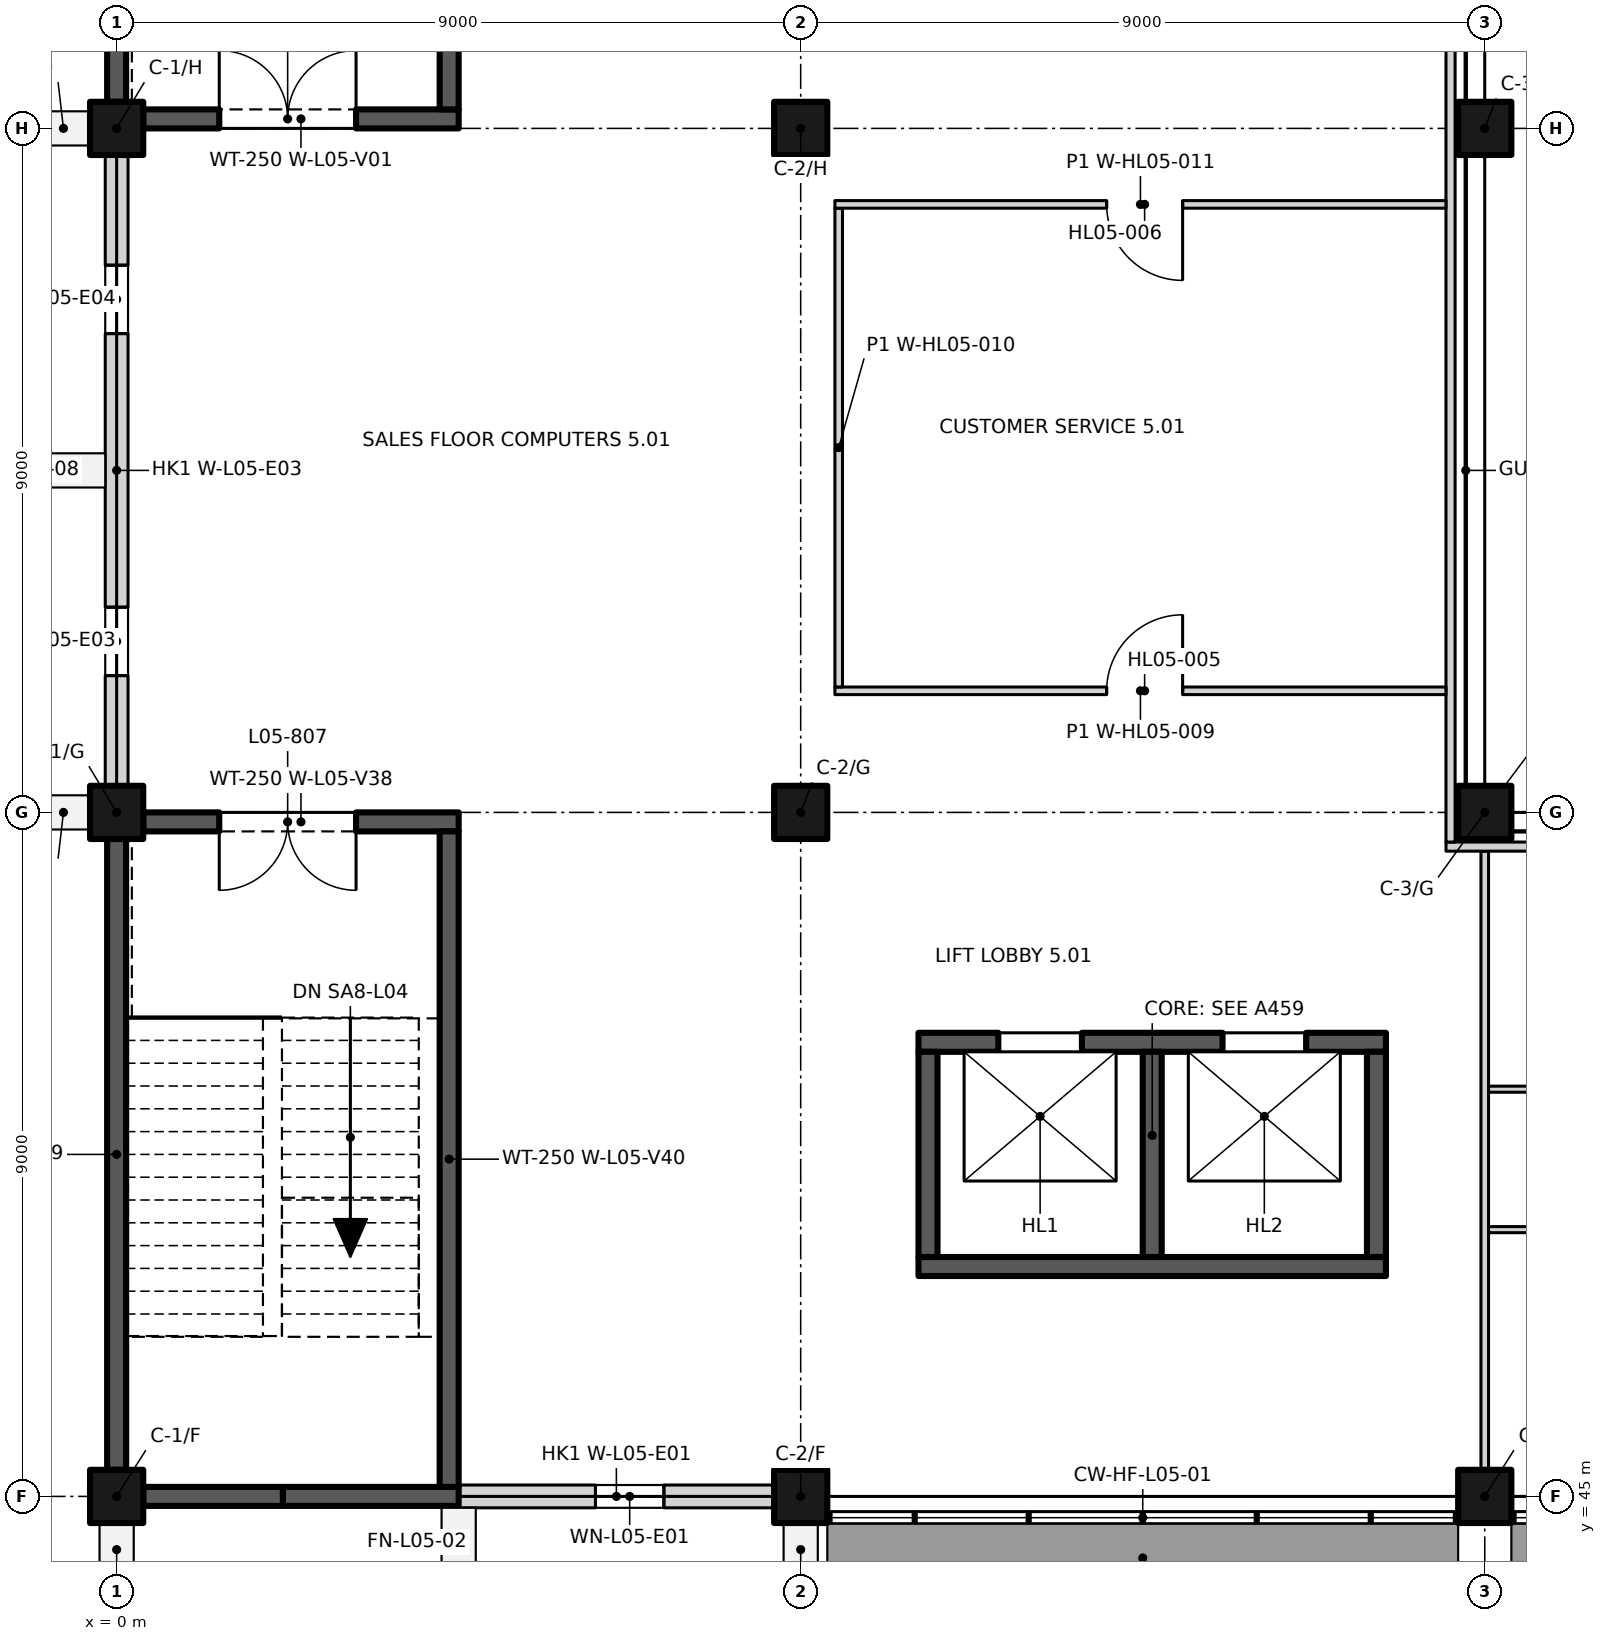
"""IFC4 building model, lengths in metres.
Left out: names, types, materials, properties, quantities, classifications, styles, units other than length and angle.
Written with IfcOpenShell. Run it as: python <this file> out.ifc"""

import sys

from ifc_helpers import new_model, si_unit, direction, frame, frame_2d, origin, origin_2d, place, context, subcontext, project, spatial, rectangle, extrude, element, fill, save


model = new_model("IFC4")
c1 = context("Model", 3, precision=1e-05, world=origin(), true_north=direction((0.0, 1.0)))
c2 = subcontext(c1, "Body", "Model", "MODEL_VIEW")
j1 = project(units=[si_unit("LENGTHUNIT", "METRE"), si_unit("PLANEANGLEUNIT", "RADIAN")], contexts=[c1])
p1 = place(None, origin())
s1 = spatial("IfcSite", under=j1, at=p1, CompositionType="ELEMENT")
p2 = place(p1, origin())
s2 = spatial("IfcBuilding", under=s1, at=p2, CompositionType="ELEMENT")
p3 = place(p2, frame((0.0, 0.0, 24.0)))
s3 = spatial("IfcBuildingStorey", under=s2, at=p3, CompositionType="ELEMENT", Elevation=24.0)
for number, where, z_axis, x_axis in (
    (1, (0.0, 45.0, 0.0), (0.0, 0.0, 1.0), (1.0, 0.0, 0.0)),
    (2, (9.0, 45.0, 0.0), (0.0, 0.0, 1.0), (1.0, 0.0, 0.0)),
    (3, (18.0, 45.0, 0.0), (0.0, 0.0, 1.0), (1.0, 0.0, 0.0)),
    (4, (0.0, 54.0, 0.0), (0.0, 0.0, 1.0), (1.0, 0.0, 0.0)),
    (5, (9.0, 54.0, 0.0), (0.0, 0.0, 1.0), (1.0, 0.0, 0.0)),
    (6, (18.0, 54.0, 0.0), (0.0, 0.0, 1.0), (1.0, 0.0, 0.0)),
    (7, (0.0, 63.0, 0.0), (0.0, 0.0, 1.0), (1.0, 0.0, 0.0)),
    (8, (9.0, 63.0, 0.0), (0.0, 0.0, 1.0), (1.0, 0.0, 0.0)),
    (9, (18.0, 63.0, 0.0), (0.0, 0.0, 1.0), (1.0, 0.0, 0.0)),
):
    element("IfcColumn", number, at=place(p3, frame(where, z_axis=z_axis, x_axis=x_axis)), inside=s3, PredefinedType="COLUMN", context=c2, shape_type="SweptSolid", body=[
        extrude(rectangle(XDim=0.7, YDim=0.7, at=origin_2d()), origin(), (0.0, 0.0, 1.0), 4.5),
    ])
p4 = place(p3, frame((0.35, 63.125, 0.0), z_axis=(0.0, 0.0, 1.0), x_axis=(1.0, 0.0, 0.0)))
e10 = element("IfcWall", 10, at=p4, inside=s3, PredefinedType="SHEAR", context=c2, shape_type="SweptSolid", body=[
    extrude(rectangle(XDim=4.15, YDim=0.25, at=frame_2d((2.075, 0.0))), origin(), (0.0, 0.0, 1.0), 4.2),
])
p5 = place(p4, frame((1.0, 0.0, 0.0)))
e11 = element("IfcOpeningElement", 11, at=p5, cuts=e10, PredefinedType="OPENING", context=c2, shape_type="SweptSolid", body=[
    extrude(rectangle(XDim=1.8, YDim=2.1, at=frame_2d((0.9, 1.05))), frame((0.0, 0.135, 0.0), z_axis=(0.0, -1.0, 0.0), x_axis=(1.0, 0.0, 0.0)), (0.0, 0.0, 1.0), 0.27),
])
p6 = place(p3, frame((0.0, 63.35, 0.0), z_axis=(0.0, 0.0, 1.0), x_axis=(0.0, 1.0, 0.0)))
e12 = element("IfcWall", 12, at=p6, inside=s3, PredefinedType="SHEAR", context=c2, shape_type="SweptSolid", body=[
    extrude(rectangle(XDim=8.3, YDim=0.25, at=frame_2d((4.15, 0.0))), origin(), (0.0, 0.0, 1.0), 3.7),
])
p7 = place(p3, frame((4.375, 63.25, 0.0), z_axis=(0.0, 0.0, 1.0), x_axis=(0.0, 1.0, 0.0)))
e13 = element("IfcWall", 13, at=p7, inside=s3, PredefinedType="SHEAR", context=c2, shape_type="SweptSolid", body=[
    extrude(rectangle(XDim=8.5, YDim=0.25, at=frame_2d((4.25, 0.0))), origin(), (0.0, 0.0, 1.0), 4.2),
])
p8 = place(p3, frame((0.35, 45.0, 0.0), z_axis=(0.0, 0.0, 1.0), x_axis=(1.0, 0.0, 0.0)))
e14 = element("IfcWall", 14, at=p8, inside=s3, PredefinedType="SHEAR", context=c2, shape_type="SweptSolid", body=[
    extrude(rectangle(XDim=1.838, YDim=0.25, at=frame_2d((0.919, 0.0))), origin(), (0.0, 0.0, 1.0), 3.7),
])
p9 = place(p3, frame((2.188, 45.0, 0.0), z_axis=(0.0, 0.0, 1.0), x_axis=(1.0, 0.0, 0.0)))
e15 = element("IfcWall", 15, at=p9, inside=s3, PredefinedType="SHEAR", context=c2, shape_type="SweptSolid", body=[
    extrude(rectangle(XDim=2.312, YDim=0.25, at=frame_2d((1.156, 0.0))), origin(), (0.0, 0.0, 1.0), 3.7),
])
p10 = place(p3, frame((0.35, 53.875, 0.0), z_axis=(0.0, 0.0, 1.0), x_axis=(1.0, 0.0, 0.0)))
e16 = element("IfcWall", 16, at=p10, inside=s3, PredefinedType="SHEAR", context=c2, shape_type="SweptSolid", body=[
    extrude(rectangle(XDim=4.15, YDim=0.25, at=frame_2d((2.075, 0.0))), origin(), (0.0, 0.0, 1.0), 4.2),
])
p11 = place(p10, frame((2.8, 0.0, 0.0), z_axis=(0.0, 0.0, 1.0), x_axis=(-1.0, 0.0, 0.0)))
e17 = element("IfcOpeningElement", 17, at=p11, cuts=e16, PredefinedType="OPENING", context=c2, shape_type="SweptSolid", body=[
    extrude(rectangle(XDim=1.8, YDim=2.1, at=frame_2d((0.9, 1.05))), frame((0.0, 0.135, 0.0), z_axis=(0.0, -1.0, 0.0), x_axis=(1.0, 0.0, 0.0)), (0.0, 0.0, 1.0), 0.27),
])
p12 = place(p3, frame((0.0, 45.35, 0.0), z_axis=(0.0, 0.0, 1.0), x_axis=(0.0, 1.0, 0.0)))
e18 = element("IfcWall", 18, at=p12, inside=s3, PredefinedType="SHEAR", context=c2, shape_type="SweptSolid", body=[
    extrude(rectangle(XDim=8.3, YDim=0.25, at=frame_2d((4.15, 0.0))), origin(), (0.0, 0.0, 1.0), 3.7),
])
p13 = place(p3, frame((4.375, 45.125, 0.0), z_axis=(0.0, 0.0, 1.0), x_axis=(0.0, 1.0, 0.0)))
e19 = element("IfcWall", 19, at=p13, inside=s3, PredefinedType="SHEAR", context=c2, shape_type="SweptSolid", body=[
    extrude(rectangle(XDim=8.625, YDim=0.25, at=frame_2d((4.312, 0.0))), origin(), (0.0, 0.0, 1.0), 4.2),
])
p14 = place(p3, frame((10.55, 50.975, 0.0), z_axis=(0.0, 0.0, 1.0), x_axis=(1.0, 0.0, 0.0)))
e20 = element("IfcWall", 20, at=p14, inside=s3, PredefinedType="SHEAR", context=c2, shape_type="SweptSolid", body=[
    extrude(rectangle(XDim=6.15, YDim=0.25, at=frame_2d((3.075, 0.0))), origin(), (0.0, 0.0, 1.0), 4.5),
])
p15 = place(p14, frame((1.05, 0.0, 0.0)))
e21 = element("IfcOpeningElement", 21, at=p15, cuts=e20, PredefinedType="OPENING", context=c2, shape_type="SweptSolid", body=[
    extrude(rectangle(XDim=1.1, YDim=2.1, at=frame_2d((0.55, 1.05))), frame((0.0, 0.135, 0.0), z_axis=(0.0, -1.0, 0.0), x_axis=(1.0, 0.0, 0.0)), (0.0, 0.0, 1.0), 0.27),
])
p16 = place(p14, frame((4.0, 0.0, 0.0)))
e22 = element("IfcOpeningElement", 22, at=p16, cuts=e20, PredefinedType="OPENING", context=c2, shape_type="SweptSolid", body=[
    extrude(rectangle(XDim=1.1, YDim=2.1, at=frame_2d((0.55, 1.05))), frame((0.0, 0.135, 0.0), z_axis=(0.0, -1.0, 0.0), x_axis=(1.0, 0.0, 0.0)), (0.0, 0.0, 1.0), 0.27),
])
p17 = place(p3, frame((10.55, 48.025, 0.0), z_axis=(0.0, 0.0, 1.0), x_axis=(1.0, 0.0, 0.0)))
e23 = element("IfcWall", 23, at=p17, inside=s3, PredefinedType="SHEAR", context=c2, shape_type="SweptSolid", body=[
    extrude(rectangle(XDim=6.15, YDim=0.25, at=frame_2d((3.075, 0.0))), origin(), (0.0, 0.0, 1.0), 4.5),
])
for number, where, z_axis, x_axis in (
    (24, (10.675, 48.15, 0.0), (0.0, 0.0, 1.0), (0.0, 1.0, 0.0)),
    (25, (13.625, 48.15, 0.0), (0.0, 0.0, 1.0), (0.0, 1.0, 0.0)),
    (26, (16.575, 48.15, 0.0), (0.0, 0.0, 1.0), (0.0, 1.0, 0.0)),
):
    element("IfcWall", number, at=place(p3, frame(where, z_axis=z_axis, x_axis=x_axis)), inside=s3, PredefinedType="SHEAR", context=c2, shape_type="SweptSolid", body=[
        extrude(rectangle(XDim=2.7, YDim=0.25, at=frame_2d((1.35, 0.0))), origin(), (0.0, 0.0, 1.0), 4.5),
    ])
p18 = place(p3, frame((8.65, 45.0, 0.0), z_axis=(0.0, 0.0, 1.0), x_axis=(-1.0, 0.0, 0.0)))
e27 = element("IfcWall", 27, at=p18, inside=s3, PredefinedType="SOLIDWALL", context=c2, shape_type="SweptSolid", body=[
    extrude(rectangle(XDim=4.15, YDim=0.3, at=frame_2d((2.075, 0.0))), origin(), (0.0, 0.0, 1.0), 3.7),
])
p19 = place(p18, frame((1.45, 0.0, 0.45)))
e28 = element("IfcOpeningElement", 28, at=p19, cuts=e27, PredefinedType="OPENING", context=c2, shape_type="SweptSolid", body=[
    extrude(rectangle(XDim=0.9, YDim=3.0, at=frame_2d((0.45, 1.5))), frame((0.0, 0.16, 0.0), z_axis=(0.0, -1.0, 0.0), x_axis=(1.0, 0.0, 0.0)), (0.0, 0.0, 1.0), 0.32),
])
p20 = place(p3, frame((0.0, 54.35, 0.0), z_axis=(0.0, 0.0, 1.0), x_axis=(0.0, 1.0, 0.0)))
e29 = element("IfcWall", 29, at=p20, inside=s3, PredefinedType="SOLIDWALL", context=c2, shape_type="SweptSolid", body=[
    extrude(rectangle(XDim=8.3, YDim=0.3, at=frame_2d((4.15, 0.0))), origin(), (0.0, 0.0, 1.0), 3.7),
])
p21 = place(p20, frame((1.45, 0.0, 0.45)))
e30 = element("IfcOpeningElement", 30, at=p21, cuts=e29, PredefinedType="OPENING", context=c2, shape_type="SweptSolid", body=[
    extrude(rectangle(XDim=0.9, YDim=3.0, at=frame_2d((0.45, 1.5))), frame((0.0, 0.16, 0.0), z_axis=(0.0, -1.0, 0.0), x_axis=(1.0, 0.0, 0.0)), (0.0, 0.0, 1.0), 0.32),
])
p22 = place(p20, frame((5.95, 0.0, 0.45)))
e31 = element("IfcOpeningElement", 31, at=p22, cuts=e29, PredefinedType="OPENING", context=c2, shape_type="SweptSolid", body=[
    extrude(rectangle(XDim=0.9, YDim=3.0, at=frame_2d((0.45, 1.5))), frame((0.0, 0.16, 0.0), z_axis=(0.0, -1.0, 0.0), x_axis=(1.0, 0.0, 0.0)), (0.0, 0.0, 1.0), 0.32),
])
p23 = place(p3, frame((18.0, 45.35, 0.0), z_axis=(0.0, 0.0, 1.0), x_axis=(0.0, 1.0, 0.0)))
e32 = element("IfcWall", 32, at=p23, inside=s3, PredefinedType="PARTITIONING", context=c2, shape_type="SweptSolid", body=[
    extrude(rectangle(XDim=8.14, YDim=0.1, at=frame_2d((4.07, 0.0))), origin(), (0.0, 0.0, 1.0), 3.7),
])
for number, where, z_axis, x_axis in (
    (33, (18.05, 48.51, 0.0), (0.0, 0.0, 1.0), (1.0, 0.0, 0.0)),
    (34, (18.05, 50.358, 0.0), (0.0, 0.0, 1.0), (1.0, 0.0, 0.0)),
):
    element("IfcWall", number, at=place(p3, frame(where, z_axis=z_axis, x_axis=x_axis)), inside=s3, PredefinedType="PARTITIONING", context=c2, shape_type="SweptSolid", body=[
        extrude(rectangle(XDim=5.9, YDim=0.08, at=frame_2d((2.95, 0.0))), origin(), (0.0, 0.0, 1.0), 3.7),
    ])
p24 = place(p3, frame((17.49, 53.55, 0.0), z_axis=(0.0, 0.0, 1.0), x_axis=(1.0, 0.0, 0.0)))
e35 = element("IfcWall", 35, at=p24, inside=s3, PredefinedType="PARTITIONING", context=c2, shape_type="SweptSolid", body=[
    extrude(rectangle(XDim=28.02, YDim=0.12, at=frame_2d((14.01, 0.0))), origin(), (0.0, 0.0, 1.0), 3.7),
])
p25 = place(p3, frame((17.55, 53.61, 0.0), z_axis=(0.0, 0.0, 1.0), x_axis=(0.0, 1.0, 0.0)))
e36 = element("IfcWall", 36, at=p25, inside=s3, PredefinedType="PARTITIONING", context=c2, shape_type="SweptSolid", body=[
    extrude(rectangle(XDim=36.515, YDim=0.12, at=frame_2d((18.257, 0.0))), origin(), (0.0, 0.0, 1.0), 3.7),
])
p26 = place(p3, frame((9.45, 55.6, 0.0), z_axis=(0.0, 0.0, 1.0), x_axis=(1.0, 0.0, 0.0)))
e37 = element("IfcWall", 37, at=p26, inside=s3, PredefinedType="PARTITIONING", context=c2, shape_type="SweptSolid", body=[
    extrude(rectangle(XDim=8.04, YDim=0.1, at=frame_2d((4.02, 0.0))), origin(), (0.0, 0.0, 1.0), 4.2),
])
p27 = place(p26, frame((3.575, 0.0, 0.0)))
e38 = element("IfcOpeningElement", 38, at=p27, cuts=e37, PredefinedType="OPENING", context=c2, shape_type="SweptSolid", body=[
    extrude(rectangle(XDim=1.0, YDim=2.1, at=frame_2d((0.5, 1.05))), frame((0.0, 0.06, 0.0), z_axis=(0.0, -1.0, 0.0), x_axis=(1.0, 0.0, 0.0)), (0.0, 0.0, 1.0), 0.12),
])
p28 = place(p3, frame((9.5, 55.65, 0.0), z_axis=(0.0, 0.0, 1.0), x_axis=(0.0, 1.0, 0.0)))
e39 = element("IfcWall", 39, at=p28, inside=s3, PredefinedType="PARTITIONING", context=c2, shape_type="SweptSolid", body=[
    extrude(rectangle(XDim=6.3, YDim=0.1, at=frame_2d((3.15, 0.0))), origin(), (0.0, 0.0, 1.0), 4.2),
])
p29 = place(p3, frame((9.45, 62.0, 0.0), z_axis=(0.0, 0.0, 1.0), x_axis=(1.0, 0.0, 0.0)))
e40 = element("IfcWall", 40, at=p29, inside=s3, PredefinedType="PARTITIONING", context=c2, shape_type="SweptSolid", body=[
    extrude(rectangle(XDim=8.04, YDim=0.1, at=frame_2d((4.02, 0.0))), origin(), (0.0, 0.0, 1.0), 4.2),
])
p30 = place(p29, frame((4.575, 0.0, 0.0), z_axis=(0.0, 0.0, 1.0), x_axis=(-1.0, 0.0, 0.0)))
e41 = element("IfcOpeningElement", 41, at=p30, cuts=e40, PredefinedType="OPENING", context=c2, shape_type="SweptSolid", body=[
    extrude(rectangle(XDim=1.0, YDim=2.1, at=frame_2d((0.5, 1.05))), frame((0.0, 0.06, 0.0), z_axis=(0.0, -1.0, 0.0), x_axis=(1.0, 0.0, 0.0)), (0.0, 0.0, 1.0), 0.12),
])
p31 = place(p5, origin())
e42 = element("IfcDoor", 42, at=p31, inside=s3, OperationType="DOUBLE_DOOR_SINGLE_SWING", PredefinedType="DOOR", context=c2, shape_type="SweptSolid", body=[
    extrude(rectangle(XDim=1.8, YDim=2.1, at=frame_2d((0.9, 1.05))), frame((0.0, 0.025, 0.0), z_axis=(0.0, -1.0, 0.0), x_axis=(1.0, 0.0, 0.0)), (0.0, 0.0, 1.0), 0.05),
])
fill(e11, e42)
p32 = place(p11, origin())
e43 = element("IfcDoor", 43, at=p32, inside=s3, OperationType="DOUBLE_DOOR_SINGLE_SWING", PredefinedType="DOOR", context=c2, shape_type="SweptSolid", body=[
    extrude(rectangle(XDim=1.8, YDim=2.1, at=frame_2d((0.9, 1.05))), frame((0.0, 0.025, 0.0), z_axis=(0.0, -1.0, 0.0), x_axis=(1.0, 0.0, 0.0)), (0.0, 0.0, 1.0), 0.05),
])
fill(e17, e43)
p33 = place(p15, origin())
e44 = element("IfcDoor", 44, at=p33, inside=s3, OperationType="DOUBLE_DOOR_SLIDING", PredefinedType="DOOR", context=c2, shape_type="SweptSolid", body=[
    extrude(rectangle(XDim=1.1, YDim=2.1, at=frame_2d((0.55, 1.05))), frame((0.0, 0.025, 0.0), z_axis=(0.0, -1.0, 0.0), x_axis=(1.0, 0.0, 0.0)), (0.0, 0.0, 1.0), 0.05),
])
fill(e21, e44)
p34 = place(p16, origin())
e45 = element("IfcDoor", 45, at=p34, inside=s3, OperationType="DOUBLE_DOOR_SLIDING", PredefinedType="DOOR", context=c2, shape_type="SweptSolid", body=[
    extrude(rectangle(XDim=1.1, YDim=2.1, at=frame_2d((0.55, 1.05))), frame((0.0, 0.025, 0.0), z_axis=(0.0, -1.0, 0.0), x_axis=(1.0, 0.0, 0.0)), (0.0, 0.0, 1.0), 0.05),
])
fill(e22, e45)
p35 = place(p19, origin())
e46 = element("IfcWindow", 46, at=p35, inside=s3, PartitioningType="SINGLE_PANEL", PredefinedType="WINDOW", context=c2, shape_type="SweptSolid", body=[
    extrude(rectangle(XDim=0.9, YDim=3.0, at=frame_2d((0.45, 1.5))), frame((0.0, -0.03, 0.0), z_axis=(0.0, -1.0, 0.0), x_axis=(1.0, 0.0, 0.0)), (0.0, 0.0, 1.0), 0.06),
])
fill(e28, e46)
p36 = place(p21, origin())
e47 = element("IfcWindow", 47, at=p36, inside=s3, PartitioningType="SINGLE_PANEL", PredefinedType="WINDOW", context=c2, shape_type="SweptSolid", body=[
    extrude(rectangle(XDim=0.9, YDim=3.0, at=frame_2d((0.45, 1.5))), frame((0.0, -0.03, 0.0), z_axis=(0.0, -1.0, 0.0), x_axis=(1.0, 0.0, 0.0)), (0.0, 0.0, 1.0), 0.06),
])
fill(e30, e47)
p37 = place(p22, origin())
e48 = element("IfcWindow", 48, at=p37, inside=s3, PartitioningType="SINGLE_PANEL", PredefinedType="WINDOW", context=c2, shape_type="SweptSolid", body=[
    extrude(rectangle(XDim=0.9, YDim=3.0, at=frame_2d((0.45, 1.5))), frame((0.0, -0.03, 0.0), z_axis=(0.0, -1.0, 0.0), x_axis=(1.0, 0.0, 0.0)), (0.0, 0.0, 1.0), 0.06),
])
fill(e31, e48)
p38 = place(p27, origin())
e49 = element("IfcDoor", 49, at=p38, inside=s3, OperationType="SINGLE_SWING_RIGHT", PredefinedType="DOOR", context=c2, shape_type="SweptSolid", body=[
    extrude(rectangle(XDim=1.0, YDim=2.1, at=frame_2d((0.5, 1.05))), frame((0.0, 0.025, 0.0), z_axis=(0.0, -1.0, 0.0), x_axis=(1.0, 0.0, 0.0)), (0.0, 0.0, 1.0), 0.05),
])
fill(e38, e49)
p39 = place(p30, origin())
e50 = element("IfcDoor", 50, at=p39, inside=s3, OperationType="SINGLE_SWING_LEFT", PredefinedType="DOOR", context=c2, shape_type="SweptSolid", body=[
    extrude(rectangle(XDim=1.0, YDim=2.1, at=frame_2d((0.5, 1.05))), frame((0.0, 0.025, 0.0), z_axis=(0.0, -1.0, 0.0), x_axis=(1.0, 0.0, 0.0)), (0.0, 0.0, 1.0), 0.05),
])
fill(e41, e50)
save(model, sys.argv[1])
